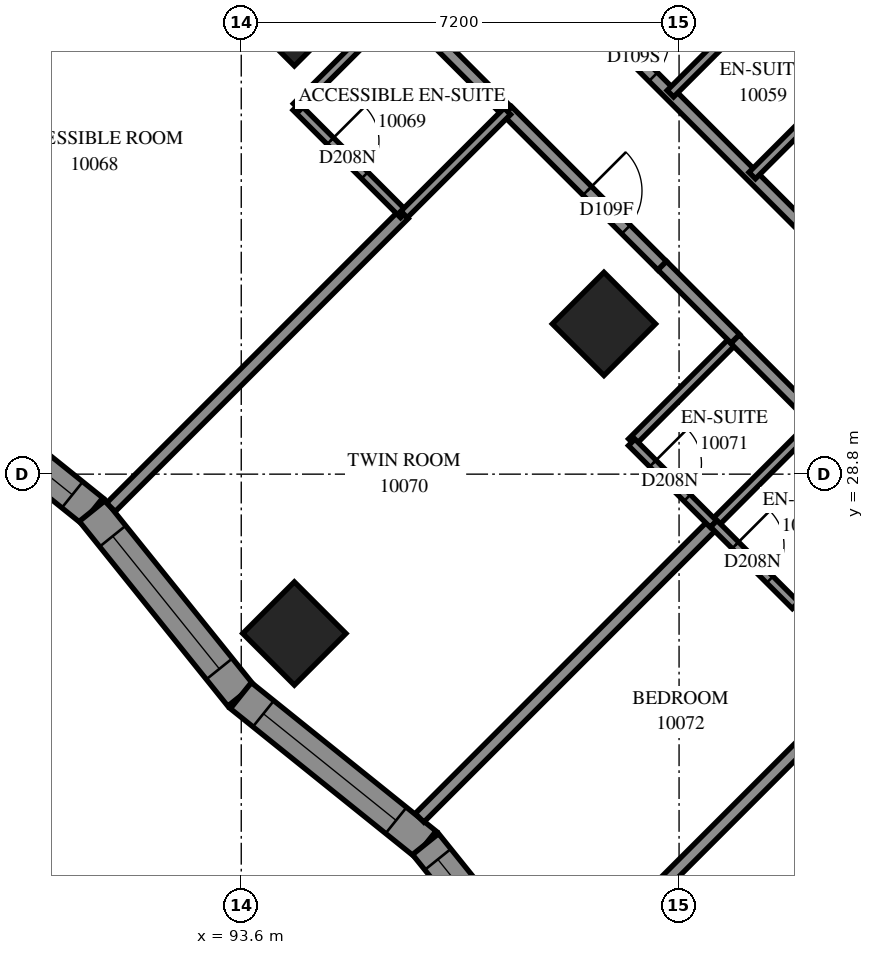
"""IFC4 building model, lengths in metres.
Left out: names, types, materials, properties, quantities, classifications, styles, units other than length and angle.
Written with IfcOpenShell. Run it as: python <this file> out.ifc"""

import sys

from ifc_helpers import new_model, si_unit, direction, frame, frame_2d, origin, origin_2d, place, context, subcontext, project, spatial, polyline, rectangle, outline, extrude, element, fill, save


model = new_model("IFC4")
c1 = context("Model", 3, precision=1e-05, world=origin(), true_north=direction((0.0, 1.0)))
c2 = subcontext(c1, "Body", "Model", "MODEL_VIEW")
j1 = project(units=[si_unit("LENGTHUNIT", "METRE"), si_unit("PLANEANGLEUNIT", "RADIAN")], contexts=[c1])
p1 = place(None, origin())
s1 = spatial("IfcSite", under=j1, at=p1, CompositionType="ELEMENT")
p2 = place(p1, origin())
s2 = spatial("IfcBuilding", under=s1, at=p2, CompositionType="ELEMENT")
p3 = place(p2, frame((0.0, 0.0, 40.6)))
s3 = spatial("IfcBuildingStorey", under=s2, at=p3, CompositionType="ELEMENT", Elevation=40.6)
for number, where, z_axis, x_axis in (
    (1, (94.474, 36.362, 0.0), (0.0, 0.0, 1.0), (0.707, -0.707, 0.0)),
    (2, (99.565, 31.271, 0.0), (0.0, 0.0, 1.0), (0.707, -0.707, 0.0)),
    (3, (94.474, 26.18, 0.0), (0.0, 0.0, 1.0), (0.707, -0.707, 0.0)),
):
    element("IfcColumn", number, at=place(p3, frame(where, z_axis=z_axis, x_axis=x_axis)), inside=s3, PredefinedType="COLUMN", context=c2, shape_type="SweptSolid", body=[
        extrude(rectangle(XDim=1.2, YDim=1.2, at=origin_2d()), origin(), (0.0, 0.0, 1.0), 3.1),
    ])
p4 = place(p3, frame((88.113, 30.639, 0.0), z_axis=(0.0, 0.0, 1.0), x_axis=(0.7793447186, -0.6265954114, 0.0)))
e4 = element("IfcWall", 4, at=p4, inside=s3, PredefinedType="SOLIDWALL", context=c2, shape_type="SweptSolid", body=[
    extrude(outline(polyline([(-0.03, -0.275), (3.868, -0.275), (3.928, 0.275), (0.03, 0.275), (-0.03, -0.275)])), origin(), (0.0, 0.0, 1.0), 3.1),
])
p5 = place(p4, frame((0.675, 0.0, 0.5)))
e5 = element("IfcOpeningElement", 5, at=p5, cuts=e4, PredefinedType="OPENING", context=c2, shape_type="SweptSolid", body=[
    extrude(rectangle(XDim=2.8, YDim=2.45, at=frame_2d((1.4, 1.225))), frame((0.0, 0.285, 0.0), z_axis=(0.0, -1.0, 0.0), x_axis=(1.0, 0.0, 0.0)), (0.0, 0.0, 1.0), 0.57),
])
p6 = place(p3, frame((91.151, 28.196, 0.0), z_axis=(0.0, 0.0, 1.0), x_axis=(0.6266079397, -0.7793346456, 0.0)))
e6 = element("IfcWall", 6, at=p6, inside=s3, PredefinedType="SOLIDWALL", context=c2, shape_type="SweptSolid", body=[
    extrude(outline(polyline([(0.03, -0.275), (3.928, -0.275), (3.868, 0.275), (-0.03, 0.275), (0.03, -0.275)])), origin(), (0.0, 0.0, 1.0), 3.1),
])
p7 = place(p6, frame((0.534, 0.0, 0.5)))
e7 = element("IfcOpeningElement", 7, at=p7, cuts=e6, PredefinedType="OPENING", context=c2, shape_type="SweptSolid", body=[
    extrude(rectangle(XDim=2.8, YDim=2.45, at=frame_2d((1.4, 1.225))), frame((0.0, 0.285, 0.0), z_axis=(0.0, -1.0, 0.0), x_axis=(1.0, 0.0, 0.0)), (0.0, 0.0, 1.0), 0.57),
])
p8 = place(p3, frame((93.593, 25.158, 0.0), z_axis=(0.0, 0.0, 1.0), x_axis=(0.7793346456, -0.6266079397, 0.0)))
e8 = element("IfcWall", 8, at=p8, inside=s3, PredefinedType="SOLIDWALL", context=c2, shape_type="SweptSolid", body=[
    extrude(outline(polyline([(-0.03, -0.275), (3.868, -0.275), (3.928, 0.275), (0.03, 0.275), (-0.03, -0.275)])), origin(), (0.0, 0.0, 1.0), 3.1),
])
p9 = place(p8, frame((0.475, 0.0, 0.5)))
e9 = element("IfcOpeningElement", 9, at=p9, cuts=e8, PredefinedType="OPENING", context=c2, shape_type="SweptSolid", body=[
    extrude(rectangle(XDim=2.8, YDim=2.45, at=frame_2d((1.4, 1.225))), frame((0.0, 0.285, 0.0), z_axis=(0.0, -1.0, 0.0), x_axis=(1.0, 0.0, 0.0)), (0.0, 0.0, 1.0), 0.57),
])
p10 = place(p3, frame((96.631, 22.716, 0.0), z_axis=(0.0, 0.0, 1.0), x_axis=(0.6265954114, -0.7793447186, 0.0)))
e10 = element("IfcWall", 10, at=p10, inside=s3, PredefinedType="SOLIDWALL", context=c2, shape_type="SweptSolid", body=[
    extrude(outline(polyline([(0.03, -0.275), (3.928, -0.275), (3.868, 0.275), (-0.03, 0.275), (0.03, -0.275)])), origin(), (0.0, 0.0, 1.0), 3.1),
])
p11 = place(p10, frame((0.322, 0.0, 0.5)))
e11 = element("IfcOpeningElement", 11, at=p11, cuts=e10, PredefinedType="OPENING", context=c2, shape_type="SweptSolid", body=[
    extrude(rectangle(XDim=2.8, YDim=2.45, at=frame_2d((1.4, 1.225))), frame((0.0, 0.285, 0.0), z_axis=(0.0, -1.0, 0.0), x_axis=(1.0, 0.0, 0.0)), (0.0, 0.0, 1.0), 0.57),
])
p12 = place(p3, frame((86.327, 33.299, 0.0), z_axis=(0.0, 0.0, 1.0), x_axis=(0.7069989659, 0.7072145801, 0.0)))
e12 = element("IfcWall", 12, at=p12, inside=s3, PredefinedType="PARTITIONING", context=c2, shape_type="SweptSolid", body=[
    extrude(rectangle(XDim=9.276, YDim=0.2, at=frame_2d((4.638, 0.0))), origin(), (0.0, 0.0, 1.0), 3.1),
])
p13 = place(p3, frame((92.243, 40.495, 0.0), z_axis=(0.0, 0.0, 1.0), x_axis=(0.7071067812, -0.7071067812, 0.0)))
e13 = element("IfcWall", 13, at=p13, inside=s3, PredefinedType="PARTITIONING", context=c2, shape_type="SweptSolid", body=[
    extrude(rectangle(XDim=8.101, YDim=0.2, at=frame_2d((4.05, 0.0))), origin(), (0.0, 0.0, 1.0), 3.1),
])
p14 = place(p13, frame((2.75, 0.0, 0.0)))
e14 = element("IfcOpeningElement", 14, at=p14, cuts=e13, PredefinedType="OPENING", context=c2, shape_type="SweptSolid", body=[
    extrude(rectangle(XDim=0.9, YDim=2.1, at=frame_2d((0.45, 1.05))), frame((0.0, 0.11, 0.0), z_axis=(0.0, -1.0, 0.0), x_axis=(1.0, 0.0, 0.0)), (0.0, 0.0, 1.0), 0.22),
])
p15 = place(p3, frame((86.836, 35.372, 0.0), z_axis=(0.0, 0.0, 1.0), x_axis=(0.7071067812, 0.7071067812, 0.0)))
e15 = element("IfcWall", 15, at=p15, inside=s3, PredefinedType="PARTITIONING", context=c2, shape_type="SweptSolid", body=[
    extrude(rectangle(XDim=7.45, YDim=0.2, at=frame_2d((3.725, 0.0))), origin(), (0.0, 0.0, 1.0), 3.1),
])
p16 = place(p15, frame((6.192, 0.0, 0.0)))
e16 = element("IfcOpeningElement", 16, at=p16, cuts=e15, PredefinedType="OPENING", context=c2, shape_type="SweptSolid", body=[
    extrude(rectangle(XDim=1.0, YDim=2.1, at=frame_2d((0.5, 1.05))), frame((0.0, 0.11, 0.0), z_axis=(0.0, -1.0, 0.0), x_axis=(1.0, 0.0, 0.0)), (0.0, 0.0, 1.0), 0.22),
])
p17 = place(p3, frame((99.455, 36.253, 0.0), z_axis=(0.0, 0.0, 1.0), x_axis=(0.7071067812, -0.7071067812, 0.0)))
e17 = element("IfcWall", 17, at=p17, inside=s3, PredefinedType="PARTITIONING", context=c2, shape_type="SweptSolid", body=[
    extrude(rectangle(XDim=7.201, YDim=0.2, at=frame_2d((3.601, 0.0))), origin(), (0.0, 0.0, 1.0), 3.1),
])
p18 = place(p17, frame((0.401, 0.0, 0.0)))
e18 = element("IfcOpeningElement", 18, at=p18, cuts=e17, PredefinedType="OPENING", context=c2, shape_type="SweptSolid", body=[
    extrude(rectangle(XDim=0.9, YDim=2.1, at=frame_2d((0.45, 1.05))), frame((0.0, 0.11, 0.0), z_axis=(0.0, -1.0, 0.0), x_axis=(1.0, 0.0, 0.0)), (0.0, 0.0, 1.0), 0.22),
])
p19 = place(p3, frame((96.532, 23.148, 0.0), z_axis=(0.0, 0.0, 1.0), x_axis=(0.7071140939, 0.7070994684, 0.0)))
e19 = element("IfcWall", 19, at=p19, inside=s3, PredefinedType="PARTITIONING", context=c2, shape_type="SweptSolid", body=[
    extrude(rectangle(XDim=6.837, YDim=0.2, at=frame_2d((3.419, 0.0))), origin(), (0.0, 0.0, 1.0), 3.1),
])
p20 = place(p3, frame((91.456, 28.255, 0.0), z_axis=(0.0, 0.0, 1.0), x_axis=(0.7071067812, 0.7071067812, 0.0)))
e20 = element("IfcWall", 20, at=p20, inside=s3, PredefinedType="PARTITIONING", context=c2, shape_type="SweptSolid", body=[
    extrude(rectangle(XDim=6.815, YDim=0.2, at=frame_2d((3.408, 0.0))), origin(), (0.0, 0.0, 1.0), 3.1),
])
p21 = place(p3, frame((100.163, 21.689, 0.0), z_axis=(0.0, 0.0, 1.0), x_axis=(0.7071067812, 0.7071067812, 0.0)))
e21 = element("IfcWall", 21, at=p21, inside=s3, PredefinedType="PARTITIONING", context=c2, shape_type="SweptSolid", body=[
    extrude(rectangle(XDim=5.504, YDim=0.2, at=frame_2d((2.752, 0.0))), origin(), (0.0, 0.0, 1.0), 3.1),
])
p22 = place(p3, frame((97.976, 34.772, 0.0), z_axis=(0.0, 0.0, 1.0), x_axis=(0.7073845681, -0.7068288851, 0.0)))
e22 = element("IfcWall", 22, at=p22, inside=s3, PredefinedType="PARTITIONING", context=c2, shape_type="SweptSolid", body=[
    extrude(rectangle(XDim=3.599, YDim=0.2, at=frame_2d((1.8, 0.0))), origin(), (0.0, 0.0, 1.0), 3.1),
])
p23 = place(p22, frame((1.858, 0.0, 0.0)))
e23 = element("IfcOpeningElement", 23, at=p23, cuts=e22, PredefinedType="OPENING", context=c2, shape_type="SweptSolid", body=[
    extrude(rectangle(XDim=0.9, YDim=2.1, at=frame_2d((0.45, 1.05))), frame((0.0, 0.11, 0.0), z_axis=(0.0, -1.0, 0.0), x_axis=(1.0, 0.0, 0.0)), (0.0, 0.0, 1.0), 0.22),
])
p24 = place(p3, frame((94.505, 34.839, 0.0), z_axis=(0.0, 0.0, 1.0), x_axis=(0.7071067812, -0.7071067812, 0.0)))
e24 = element("IfcWall", 24, at=p24, inside=s3, PredefinedType="PARTITIONING", context=c2, shape_type="SweptSolid", body=[
    extrude(rectangle(XDim=2.5, YDim=0.15, at=frame_2d((1.25, 0.0))), origin(), (0.0, 0.0, 1.0), 3.1),
])
p25 = place(p24, frame((0.792, 0.0, 0.0)))
e25 = element("IfcOpeningElement", 25, at=p25, cuts=e24, PredefinedType="OPENING", context=c2, shape_type="SweptSolid", body=[
    extrude(rectangle(XDim=0.8, YDim=2.1, at=frame_2d((0.4, 1.05))), frame((0.0, 0.085, 0.0), z_axis=(0.0, -1.0, 0.0), x_axis=(1.0, 0.0, 0.0)), (0.0, 0.0, 1.0), 0.17),
])
for number, where, z_axis, x_axis in (
    (26, (102.003, 33.711, 0.0), (0.0, 0.0, 1.0), (0.707, 0.707, 0.0)),
    (27, (100.023, 29.327, 0.0), (0.0, 0.0, 1.0), (0.707, 0.707, 0.0)),
):
    element("IfcWall", number, at=place(p3, frame(where, z_axis=z_axis, x_axis=x_axis)), inside=s3, PredefinedType="PARTITIONING", context=c2, shape_type="SweptSolid", body=[
        extrude(rectangle(XDim=2.401, YDim=0.15, at=frame_2d((1.201, 0.0))), origin(), (0.0, 0.0, 1.0), 3.1),
    ])
for number, where, z_axis, x_axis in (
    (28, (96.278, 33.072, 0.0), (0.0, 0.0, 1.0), (0.708, 0.707, 0.0)),
    (29, (94.511, 34.839, 0.0), (0.0, 0.0, 1.0), (0.708, 0.707, 0.0)),
    (30, (100.657, 35.057, 0.0), (0.0, 0.0, 1.0), (0.708, 0.707, 0.0)),
    (31, (101.371, 27.979, 0.0), (0.0, 0.0, 1.0), (0.707, 0.708, 0.0)),
):
    element("IfcWall", number, at=place(p3, frame(where, z_axis=z_axis, x_axis=x_axis)), inside=s3, PredefinedType="PARTITIONING", context=c2, shape_type="SweptSolid", body=[
        extrude(rectangle(XDim=2.4, YDim=0.15, at=frame_2d((1.2, 0.0))), origin(), (0.0, 0.0, 1.0), 3.1),
    ])
p26 = place(p3, frame((102.711, 26.641, 0.0), z_axis=(0.0, 0.0, 1.0), x_axis=(0.7071067812, 0.7071067812, 0.0)))
e32 = element("IfcWall", 32, at=p26, inside=s3, PredefinedType="PARTITIONING", context=c2, shape_type="SweptSolid", body=[
    extrude(rectangle(XDim=2.398, YDim=0.15, at=frame_2d((1.199, 0.0))), origin(), (0.0, 0.0, 1.0), 3.1),
])
p27 = place(p3, frame((100.021, 29.323, 0.0), z_axis=(0.0, 0.0, 1.0), x_axis=(0.7071067812, -0.7071067812, 0.0)))
e33 = element("IfcWall", 33, at=p27, inside=s3, PredefinedType="PARTITIONING", context=c2, shape_type="SweptSolid", body=[
    extrude(rectangle(XDim=1.901, YDim=0.15, at=frame_2d((0.95, 0.0))), origin(), (0.0, 0.0, 1.0), 3.1),
])
p28 = place(p27, frame((0.491, 0.0, 0.0)))
e34 = element("IfcOpeningElement", 34, at=p28, cuts=e33, PredefinedType="OPENING", context=c2, shape_type="SweptSolid", body=[
    extrude(rectangle(XDim=0.8, YDim=2.1, at=frame_2d((0.4, 1.05))), frame((0.0, 0.085, 0.0), z_axis=(0.0, -1.0, 0.0), x_axis=(1.0, 0.0, 0.0)), (0.0, 0.0, 1.0), 0.17),
])
p29 = place(p3, frame((101.371, 27.985, 0.0), z_axis=(0.0, 0.0, 1.0), x_axis=(0.7076330979, -0.7065800724, 0.0)))
e35 = element("IfcWall", 35, at=p29, inside=s3, PredefinedType="PARTITIONING", context=c2, shape_type="SweptSolid", body=[
    extrude(rectangle(XDim=1.899, YDim=0.15, at=frame_2d((0.95, 0.0))), origin(), (0.0, 0.0, 1.0), 3.1),
])
p30 = place(p29, frame((0.501, 0.0, 0.0)))
e36 = element("IfcOpeningElement", 36, at=p30, cuts=e35, PredefinedType="OPENING", context=c2, shape_type="SweptSolid", body=[
    extrude(rectangle(XDim=0.8, YDim=2.1, at=frame_2d((0.4, 1.05))), frame((0.0, 0.085, 0.0), z_axis=(0.0, -1.0, 0.0), x_axis=(1.0, 0.0, 0.0)), (0.0, 0.0, 1.0), 0.17),
])
p31 = place(p3, frame((101.72, 31.022, 0.0), z_axis=(0.0, 0.0, 1.0), x_axis=(0.7065800724, -0.7076330979, 0.0)))
e37 = element("IfcWall", 37, at=p31, inside=s3, PredefinedType="PARTITIONING", context=c2, shape_type="SweptSolid", body=[
    extrude(rectangle(XDim=1.899, YDim=0.2, at=frame_2d((0.95, 0.0))), origin(), (0.0, 0.0, 1.0), 3.1),
])
p32 = place(p3, frame((102.358, 36.75, 0.0), z_axis=(0.0, 0.0, 1.0), x_axis=(0.7076330979, -0.7065800724, 0.0)))
e38 = element("IfcWall", 38, at=p32, inside=s3, PredefinedType="PARTITIONING", context=c2, shape_type="SweptSolid", body=[
    extrude(rectangle(XDim=1.899, YDim=0.15, at=frame_2d((0.95, 0.0))), origin(), (0.0, 0.0, 1.0), 3.1),
])
p33 = place(p32, frame((0.296, 0.0, 0.0)))
e39 = element("IfcOpeningElement", 39, at=p33, cuts=e38, PredefinedType="OPENING", context=c2, shape_type="SweptSolid", body=[
    extrude(rectangle(XDim=0.8, YDim=2.1, at=frame_2d((0.4, 1.05))), frame((0.0, 0.085, 0.0), z_axis=(0.0, -1.0, 0.0), x_axis=(1.0, 0.0, 0.0)), (0.0, 0.0, 1.0), 0.17),
])
p34 = place(p3, frame((100.523, 32.229, 0.0), z_axis=(0.0, 0.0, 1.0), x_axis=(0.7071067812, -0.7071067812, 0.0)))
e40 = element("IfcWall", 40, at=p34, inside=s3, PredefinedType="PARTITIONING", context=c2, shape_type="SweptSolid", body=[
    extrude(rectangle(XDim=1.7, YDim=0.2, at=frame_2d((0.85, 0.0))), origin(), (0.0, 0.0, 1.0), 3.1),
])
p35 = place(p5, origin())
e41 = element("IfcWindow", 41, at=p35, inside=s3, PartitioningType="SINGLE_PANEL", PredefinedType="WINDOW", context=c2, shape_type="SweptSolid", body=[
    extrude(rectangle(XDim=2.8, YDim=2.45, at=frame_2d((1.4, 1.225))), frame((0.0, 0.155, 0.0), z_axis=(0.0, -1.0, 0.0), x_axis=(1.0, 0.0, 0.0)), (0.0, 0.0, 1.0), 0.06),
])
fill(e5, e41)
p36 = place(p7, origin())
e42 = element("IfcWindow", 42, at=p36, inside=s3, PartitioningType="SINGLE_PANEL", PredefinedType="WINDOW", context=c2, shape_type="SweptSolid", body=[
    extrude(rectangle(XDim=2.8, YDim=2.45, at=frame_2d((1.4, 1.225))), frame((0.0, 0.155, 0.0), z_axis=(0.0, -1.0, 0.0), x_axis=(1.0, 0.0, 0.0)), (0.0, 0.0, 1.0), 0.06),
])
fill(e7, e42)
p37 = place(p9, origin())
e43 = element("IfcWindow", 43, at=p37, inside=s3, PartitioningType="SINGLE_PANEL", PredefinedType="WINDOW", context=c2, shape_type="SweptSolid", body=[
    extrude(rectangle(XDim=2.8, YDim=2.45, at=frame_2d((1.4, 1.225))), frame((0.0, 0.155, 0.0), z_axis=(0.0, -1.0, 0.0), x_axis=(1.0, 0.0, 0.0)), (0.0, 0.0, 1.0), 0.06),
])
fill(e9, e43)
p38 = place(p11, origin())
e44 = element("IfcWindow", 44, at=p38, inside=s3, PartitioningType="SINGLE_PANEL", PredefinedType="WINDOW", context=c2, shape_type="SweptSolid", body=[
    extrude(rectangle(XDim=2.8, YDim=2.45, at=frame_2d((1.4, 1.225))), frame((0.0, 0.155, 0.0), z_axis=(0.0, -1.0, 0.0), x_axis=(1.0, 0.0, 0.0)), (0.0, 0.0, 1.0), 0.06),
])
fill(e11, e44)
p39 = place(p18, origin())
e45 = element("IfcDoor", 45, at=p39, inside=s3, OperationType="SINGLE_SWING_RIGHT", PredefinedType="DOOR", context=c2, shape_type="SweptSolid", body=[
    extrude(rectangle(XDim=0.9, YDim=2.1, at=frame_2d((0.45, 1.05))), frame((0.0, 0.025, 0.0), z_axis=(0.0, -1.0, 0.0), x_axis=(1.0, 0.0, 0.0)), (0.0, 0.0, 1.0), 0.05),
])
fill(e18, e45)
p40 = place(p25, origin())
e46 = element("IfcDoor", 46, at=p40, inside=s3, OperationType="SINGLE_SWING_RIGHT", PredefinedType="DOOR", context=c2, shape_type="SweptSolid", body=[
    extrude(rectangle(XDim=0.8, YDim=2.1, at=frame_2d((0.4, 1.05))), frame((0.0, 0.025, 0.0), z_axis=(0.0, -1.0, 0.0), x_axis=(1.0, 0.0, 0.0)), (0.0, 0.0, 1.0), 0.05),
])
fill(e25, e46)
p41 = place(p23, origin())
e47 = element("IfcDoor", 47, at=p41, inside=s3, OperationType="SINGLE_SWING_LEFT", PredefinedType="DOOR", context=c2, shape_type="SweptSolid", body=[
    extrude(rectangle(XDim=0.9, YDim=2.1, at=frame_2d((0.45, 1.05))), frame((0.0, 0.025, 0.0), z_axis=(0.0, -1.0, 0.0), x_axis=(1.0, 0.0, 0.0)), (0.0, 0.0, 1.0), 0.05),
])
fill(e23, e47)
p42 = place(p28, origin())
e48 = element("IfcDoor", 48, at=p42, inside=s3, OperationType="SINGLE_SWING_RIGHT", PredefinedType="DOOR", context=c2, shape_type="SweptSolid", body=[
    extrude(rectangle(XDim=0.8, YDim=2.1, at=frame_2d((0.4, 1.05))), frame((0.0, 0.025, 0.0), z_axis=(0.0, -1.0, 0.0), x_axis=(1.0, 0.0, 0.0)), (0.0, 0.0, 1.0), 0.05),
])
fill(e34, e48)
p43 = place(p30, origin())
e49 = element("IfcDoor", 49, at=p43, inside=s3, OperationType="SINGLE_SWING_RIGHT", PredefinedType="DOOR", context=c2, shape_type="SweptSolid", body=[
    extrude(rectangle(XDim=0.8, YDim=2.1, at=frame_2d((0.4, 1.05))), frame((0.0, 0.025, 0.0), z_axis=(0.0, -1.0, 0.0), x_axis=(1.0, 0.0, 0.0)), (0.0, 0.0, 1.0), 0.05),
])
fill(e36, e49)
save(model, sys.argv[1])
